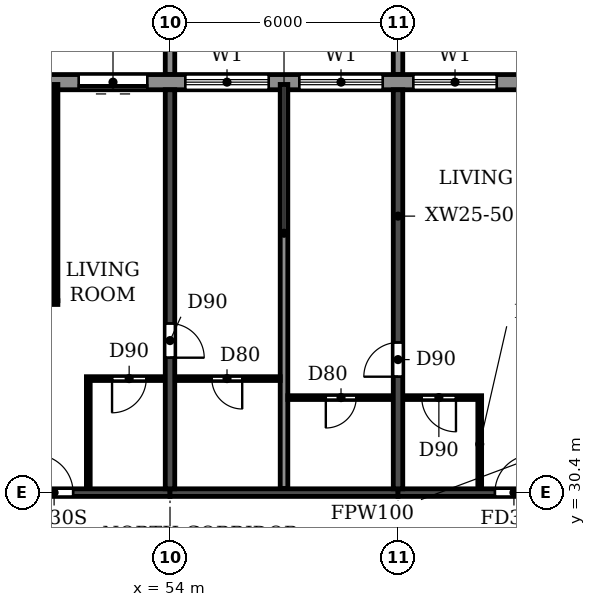
"""IFC4 building model, lengths in metres.
Left out: names, types, materials, properties, quantities, classifications, styles, units other than length and angle.
Written with IfcOpenShell. Run it as: python <this file> out.ifc"""

import sys

from ifc_helpers import new_model, si_unit, direction, frame, frame_2d, origin, place, context, subcontext, project, spatial, polyline, rectangle, outline, extrude, source, transform, mapped, element, fill, save


model = new_model("IFC4")
c1 = context("Model", 3, precision=1e-05, world=origin(), true_north=direction((0.0, 1.0)))
c2 = subcontext(c1, "Body", "Model", "MODEL_VIEW")
j1 = project(units=[si_unit("LENGTHUNIT", "METRE"), si_unit("PLANEANGLEUNIT", "RADIAN")], contexts=[c1])
p1 = place(None, origin())
s1 = spatial("IfcSite", under=j1, at=p1, CompositionType="ELEMENT")
p2 = place(p1, origin())
s2 = spatial("IfcBuilding", under=s1, at=p2, CompositionType="ELEMENT")
p3 = place(p2, frame((0.0, 0.0, 241.2)))
s3 = spatial("IfcBuildingStorey", under=s2, at=p3, CompositionType="ELEMENT", Elevation=241.2)
p4 = place(p3, frame((54.0, 30.5, 0.0), z_axis=(0.0, 0.0, 1.0), x_axis=(0.0, 1.0, 0.0)))
e1 = element("IfcWall", 1, at=p4, inside=s3, PredefinedType="SHEAR", context=c2, shape_type="SweptSolid", body=[
    extrude(rectangle(XDim=10.5, YDim=0.25, at=frame_2d((5.25, 0.0))), origin(), (0.0, 0.0, 1.0), 3.08),
])
p5 = place(p4, frame((3.45, 0.0, 0.0)))
e2 = element("IfcOpeningElement", 2, at=p5, cuts=e1, PredefinedType="OPENING", context=c2, shape_type="SweptSolid", body=[
    extrude(rectangle(XDim=0.9, YDim=2.1, at=frame_2d((0.45, 1.05))), frame((0.0, 0.135, 0.0), z_axis=(0.0, -1.0, 0.0), x_axis=(1.0, 0.0, 0.0)), (0.0, 0.0, 1.0), 0.27),
])
p6 = place(p3, frame((60.0, 30.5, 0.0), z_axis=(0.0, 0.0, 1.0), x_axis=(0.0, 1.0, 0.0)))
e3 = element("IfcWall", 3, at=p6, inside=s3, PredefinedType="SHEAR", context=c2, shape_type="SweptSolid", body=[
    extrude(rectangle(XDim=10.5, YDim=0.25, at=frame_2d((5.25, 0.0))), origin(), (0.0, 0.0, 1.0), 3.08),
])
p7 = place(p6, frame((2.95, 0.0, 0.0)))
e4 = element("IfcOpeningElement", 4, at=p7, cuts=e3, PredefinedType="OPENING", context=c2, shape_type="SweptSolid", body=[
    extrude(rectangle(XDim=0.9, YDim=2.1, at=frame_2d((0.45, 1.05))), frame((0.0, 0.135, 0.0), z_axis=(0.0, -1.0, 0.0), x_axis=(1.0, 0.0, 0.0)), (0.0, 0.0, 1.0), 0.27),
])
p8 = place(p3, frame((48.0, 30.4, 0.0), z_axis=(0.0, 0.0, 1.0), x_axis=(1.0, 0.0, 0.0)))
e5 = element("IfcWall", 5, at=p8, inside=s3, PredefinedType="SHEAR", context=c2, shape_type="SweptSolid", body=[
    extrude(rectangle(XDim=6.0, YDim=0.2, at=frame_2d((3.0, 0.0))), origin(), (0.0, 0.0, 1.0), 2.48),
])
p9 = place(p8, frame((2.45, 0.0, 0.0)))
e6 = element("IfcOpeningElement", 6, at=p9, cuts=e5, PredefinedType="OPENING", context=c2, shape_type="SweptSolid", body=[
    extrude(rectangle(XDim=1.0, YDim=2.1, at=frame_2d((0.5, 1.05))), frame((0.0, 0.11, 0.0), z_axis=(0.0, -1.0, 0.0), x_axis=(1.0, 0.0, 0.0)), (0.0, 0.0, 1.0), 0.22),
])
p10 = place(p3, frame((54.0, 30.4, 0.0), z_axis=(0.0, 0.0, 1.0), x_axis=(1.0, 0.0, 0.0)))
e7 = element("IfcWall", 7, at=p10, inside=s3, PredefinedType="SHEAR", context=c2, shape_type="SweptSolid", body=[
    extrude(rectangle(XDim=6.0, YDim=0.2, at=frame_2d((3.0, 0.0))), origin(), (0.0, 0.0, 1.0), 2.48),
])
p11 = place(p3, frame((60.0, 30.4, 0.0), z_axis=(0.0, 0.0, 1.0), x_axis=(1.0, 0.0, 0.0)))
e8 = element("IfcWall", 8, at=p11, inside=s3, PredefinedType="SHEAR", context=c2, shape_type="SweptSolid", body=[
    extrude(rectangle(XDim=6.0, YDim=0.2, at=frame_2d((3.0, 0.0))), origin(), (0.0, 0.0, 1.0), 2.48),
])
p12 = place(p11, frame((2.55, 0.0, 0.0)))
e9 = element("IfcOpeningElement", 9, at=p12, cuts=e8, PredefinedType="OPENING", context=c2, shape_type="SweptSolid", body=[
    extrude(rectangle(XDim=1.0, YDim=2.1, at=frame_2d((0.5, 1.05))), frame((0.0, 0.11, 0.0), z_axis=(0.0, -1.0, 0.0), x_axis=(1.0, 0.0, 0.0)), (0.0, 0.0, 1.0), 0.22),
])
p13 = place(p3, frame((79.317, 41.2, 0.0), z_axis=(0.0, 0.0, 1.0), x_axis=(-1.0, 0.0, 0.0)))
e10 = element("IfcWall", 10, at=p13, inside=s3, PredefinedType="STANDARD", context=c2, shape_type="SweptSolid", body=[
    extrude(rectangle(XDim=56.634, YDim=0.4, at=frame_2d((28.317, 0.0))), origin(), (0.0, 0.0, 1.0), 3.08),
])
p14 = place(p13, frame((52.917, 0.0, 0.0)))
e11 = element("IfcOpeningElement", 11, at=p14, cuts=e10, PredefinedType="OPENING", context=c2, shape_type="SweptSolid", body=[
    extrude(rectangle(XDim=1.8, YDim=2.4, at=frame_2d((0.9, 1.2))), frame((0.0, 0.21, 0.0), z_axis=(0.0, -1.0, 0.0), x_axis=(1.0, 0.0, 0.0)), (0.0, 0.0, 1.0), 0.42),
])
p15 = place(p13, frame((49.717, 0.0, 0.9)))
e12 = element("IfcOpeningElement", 12, at=p15, cuts=e10, PredefinedType="OPENING", context=c2, shape_type="SweptSolid", body=[
    extrude(rectangle(XDim=2.2, YDim=1.5, at=frame_2d((1.1, 0.75))), frame((0.0, 0.21, 0.0), z_axis=(0.0, -1.0, 0.0), x_axis=(1.0, 0.0, 0.0)), (0.0, 0.0, 1.0), 0.42),
])
p16 = place(p13, frame((46.717, 0.0, 0.9)))
e13 = element("IfcOpeningElement", 13, at=p16, cuts=e10, PredefinedType="OPENING", context=c2, shape_type="SweptSolid", body=[
    extrude(rectangle(XDim=2.2, YDim=1.5, at=frame_2d((1.1, 0.75))), frame((0.0, 0.21, 0.0), z_axis=(0.0, -1.0, 0.0), x_axis=(1.0, 0.0, 0.0)), (0.0, 0.0, 1.0), 0.42),
])
p17 = place(p13, frame((43.717, 0.0, 0.9)))
e14 = element("IfcOpeningElement", 14, at=p17, cuts=e10, PredefinedType="OPENING", context=c2, shape_type="SweptSolid", body=[
    extrude(rectangle(XDim=2.2, YDim=1.5, at=frame_2d((1.1, 0.75))), frame((0.0, 0.21, 0.0), z_axis=(0.0, -1.0, 0.0), x_axis=(1.0, 0.0, 0.0)), (0.0, 0.0, 1.0), 0.42),
])
p18 = place(p13, frame((40.917, 0.0, 0.0)))
e15 = element("IfcOpeningElement", 15, at=p18, cuts=e10, PredefinedType="OPENING", context=c2, shape_type="SweptSolid", body=[
    extrude(rectangle(XDim=1.8, YDim=2.4, at=frame_2d((0.9, 1.2))), frame((0.0, 0.21, 0.0), z_axis=(0.0, -1.0, 0.0), x_axis=(1.0, 0.0, 0.0)), (0.0, 0.0, 1.0), 0.42),
])
p19 = place(p13, frame((37.717, 0.0, 0.9)))
e16 = element("IfcOpeningElement", 16, at=p19, cuts=e10, PredefinedType="OPENING", context=c2, shape_type="SweptSolid", body=[
    extrude(rectangle(XDim=2.2, YDim=1.5, at=frame_2d((1.1, 0.75))), frame((0.0, 0.21, 0.0), z_axis=(0.0, -1.0, 0.0), x_axis=(1.0, 0.0, 0.0)), (0.0, 0.0, 1.0), 0.42),
])
p20 = place(p13, frame((34.717, 0.0, 0.9)))
e17 = element("IfcOpeningElement", 17, at=p20, cuts=e10, PredefinedType="OPENING", context=c2, shape_type="SweptSolid", body=[
    extrude(rectangle(XDim=2.2, YDim=1.5, at=frame_2d((1.1, 0.75))), frame((0.0, 0.21, 0.0), z_axis=(0.0, -1.0, 0.0), x_axis=(1.0, 0.0, 0.0)), (0.0, 0.0, 1.0), 0.42),
])
p21 = place(p13, frame((31.717, 0.0, 0.9)))
e18 = element("IfcOpeningElement", 18, at=p21, cuts=e10, PredefinedType="OPENING", context=c2, shape_type="SweptSolid", body=[
    extrude(rectangle(XDim=2.2, YDim=1.5, at=frame_2d((1.1, 0.75))), frame((0.0, 0.21, 0.0), z_axis=(0.0, -1.0, 0.0), x_axis=(1.0, 0.0, 0.0)), (0.0, 0.0, 1.0), 0.42),
])
p22 = place(p13, frame((28.717, 0.0, 0.9)))
e19 = element("IfcOpeningElement", 19, at=p22, cuts=e10, PredefinedType="OPENING", context=c2, shape_type="SweptSolid", body=[
    extrude(rectangle(XDim=2.2, YDim=1.5, at=frame_2d((1.1, 0.75))), frame((0.0, 0.21, 0.0), z_axis=(0.0, -1.0, 0.0), x_axis=(1.0, 0.0, 0.0)), (0.0, 0.0, 1.0), 0.42),
])
p23 = place(p13, frame((25.917, 0.0, 0.0)))
e20 = element("IfcOpeningElement", 20, at=p23, cuts=e10, PredefinedType="OPENING", context=c2, shape_type="SweptSolid", body=[
    extrude(rectangle(XDim=1.8, YDim=2.4, at=frame_2d((0.9, 1.2))), frame((0.0, 0.21, 0.0), z_axis=(0.0, -1.0, 0.0), x_axis=(1.0, 0.0, 0.0)), (0.0, 0.0, 1.0), 0.42),
])
p24 = place(p13, frame((22.717, 0.0, 0.9)))
e21 = element("IfcOpeningElement", 21, at=p24, cuts=e10, PredefinedType="OPENING", context=c2, shape_type="SweptSolid", body=[
    extrude(rectangle(XDim=2.2, YDim=1.5, at=frame_2d((1.1, 0.75))), frame((0.0, 0.21, 0.0), z_axis=(0.0, -1.0, 0.0), x_axis=(1.0, 0.0, 0.0)), (0.0, 0.0, 1.0), 0.42),
])
p25 = place(p13, frame((19.717, 0.0, 0.9)))
e22 = element("IfcOpeningElement", 22, at=p25, cuts=e10, PredefinedType="OPENING", context=c2, shape_type="SweptSolid", body=[
    extrude(rectangle(XDim=2.2, YDim=1.5, at=frame_2d((1.1, 0.75))), frame((0.0, 0.21, 0.0), z_axis=(0.0, -1.0, 0.0), x_axis=(1.0, 0.0, 0.0)), (0.0, 0.0, 1.0), 0.42),
])
p26 = place(p13, frame((16.717, 0.0, 0.9)))
e23 = element("IfcOpeningElement", 23, at=p26, cuts=e10, PredefinedType="OPENING", context=c2, shape_type="SweptSolid", body=[
    extrude(rectangle(XDim=2.2, YDim=1.5, at=frame_2d((1.1, 0.75))), frame((0.0, 0.21, 0.0), z_axis=(0.0, -1.0, 0.0), x_axis=(1.0, 0.0, 0.0)), (0.0, 0.0, 1.0), 0.42),
])
p27 = place(p13, frame((13.917, 0.0, 0.0)))
e24 = element("IfcOpeningElement", 24, at=p27, cuts=e10, PredefinedType="OPENING", context=c2, shape_type="SweptSolid", body=[
    extrude(rectangle(XDim=1.8, YDim=2.4, at=frame_2d((0.9, 1.2))), frame((0.0, 0.21, 0.0), z_axis=(0.0, -1.0, 0.0), x_axis=(1.0, 0.0, 0.0)), (0.0, 0.0, 1.0), 0.42),
])
p28 = place(p13, frame((10.717, 0.0, 0.9)))
e25 = element("IfcOpeningElement", 25, at=p28, cuts=e10, PredefinedType="OPENING", context=c2, shape_type="SweptSolid", body=[
    extrude(rectangle(XDim=2.2, YDim=1.5, at=frame_2d((1.1, 0.75))), frame((0.0, 0.21, 0.0), z_axis=(0.0, -1.0, 0.0), x_axis=(1.0, 0.0, 0.0)), (0.0, 0.0, 1.0), 0.42),
])
p29 = place(p13, frame((7.917, 0.0, 0.0)))
e26 = element("IfcOpeningElement", 26, at=p29, cuts=e10, PredefinedType="OPENING", context=c2, shape_type="SweptSolid", body=[
    extrude(rectangle(XDim=1.8, YDim=2.4, at=frame_2d((0.9, 1.2))), frame((0.0, 0.21, 0.0), z_axis=(0.0, -1.0, 0.0), x_axis=(1.0, 0.0, 0.0)), (0.0, 0.0, 1.0), 0.42),
])
p30 = place(p13, frame((4.717, 0.0, 0.9)))
e27 = element("IfcOpeningElement", 27, at=p30, cuts=e10, PredefinedType="OPENING", context=c2, shape_type="SweptSolid", body=[
    extrude(rectangle(XDim=2.2, YDim=1.5, at=frame_2d((1.1, 0.75))), frame((0.0, 0.21, 0.0), z_axis=(0.0, -1.0, 0.0), x_axis=(1.0, 0.0, 0.0)), (0.0, 0.0, 1.0), 0.42),
])
p31 = place(p13, frame((1.917, 0.0, 0.0)))
e28 = element("IfcOpeningElement", 28, at=p31, cuts=e10, PredefinedType="OPENING", context=c2, shape_type="SweptSolid", body=[
    extrude(rectangle(XDim=1.8, YDim=2.4, at=frame_2d((0.9, 1.2))), frame((0.0, 0.21, 0.0), z_axis=(0.0, -1.0, 0.0), x_axis=(1.0, 0.0, 0.0)), (0.0, 0.0, 1.0), 0.42),
])
m1 = source(origin(), c2, "Body", "SweptSolid", [
    extrude(outline(polyline([(0.0, 0.0), (0.25, 0.0), (0.25, 3.1), (0.0, 3.1), (0.0, 0.0)])), origin(), (0.0, 0.0, 1.0), 3.1),
])
for number, where in (
    (29, (53.875, 41.4, 0.0)),
    (30, (59.875, 41.4, 0.0)),
):
    element("IfcWall", number, at=place(p3, frame(where)), inside=s3, PredefinedType="STANDARD", context=c2, shape_type="MappedRepresentation", body=[
        mapped(m1, transform((0.0, 0.0, 0.0))),
    ])
p32 = place(p3, frame((57.0, 30.51, 0.0), z_axis=(0.0, 0.0, 1.0), x_axis=(0.0, 1.0, 0.0)))
e31 = element("IfcWall", 31, at=p32, inside=s3, PredefinedType="PARTITIONING", context=c2, shape_type="SweptSolid", body=[
    extrude(rectangle(XDim=10.63, YDim=0.2, at=frame_2d((5.315, 0.0))), origin(), (0.0, 0.0, 1.0), 3.08),
])
p33 = place(p3, frame((57.1, 32.9, 0.0), z_axis=(0.0, 0.0, 1.0), x_axis=(1.0, 0.0, 0.0)))
e32 = element("IfcWall", 32, at=p33, inside=s3, PredefinedType="PARTITIONING", context=c2, shape_type="SweptSolid", body=[
    extrude(rectangle(XDim=2.765, YDim=0.1, at=frame_2d((1.382, 0.0))), origin(), (0.0, 0.0, 1.0), 3.08),
])
p34 = place(p33, frame((1.0, 0.0, 0.0)))
e33 = element("IfcOpeningElement", 33, at=p34, cuts=e32, PredefinedType="OPENING", context=c2, shape_type="SweptSolid", body=[
    extrude(rectangle(XDim=0.8, YDim=2.1, at=frame_2d((0.4, 1.05))), frame((0.0, 0.06, 0.0), z_axis=(0.0, -1.0, 0.0), x_axis=(1.0, 0.0, 0.0)), (0.0, 0.0, 1.0), 0.12),
])
p35 = place(p3, frame((60.135, 32.9, 0.0), z_axis=(0.0, 0.0, 1.0), x_axis=(1.0, 0.0, 0.0)))
e34 = element("IfcWall", 34, at=p35, inside=s3, PredefinedType="PARTITIONING", context=c2, shape_type="SweptSolid", body=[
    extrude(rectangle(XDim=2.065, YDim=0.1, at=frame_2d((1.032, 0.0))), origin(), (0.0, 0.0, 1.0), 3.08),
])
p36 = place(p35, frame((0.49, 0.0, 0.0)))
e35 = element("IfcOpeningElement", 35, at=p36, cuts=e34, PredefinedType="OPENING", context=c2, shape_type="SweptSolid", body=[
    extrude(rectangle(XDim=0.9, YDim=2.1, at=frame_2d((0.45, 1.05))), frame((0.0, 0.06, 0.0), z_axis=(0.0, -1.0, 0.0), x_axis=(1.0, 0.0, 0.0)), (0.0, 0.0, 1.0), 0.12),
])
p37 = place(p3, frame((51.8, 33.4, 0.0), z_axis=(0.0, 0.0, 1.0), x_axis=(1.0, 0.0, 0.0)))
e36 = element("IfcWall", 36, at=p37, inside=s3, PredefinedType="PARTITIONING", context=c2, shape_type="SweptSolid", body=[
    extrude(rectangle(XDim=2.065, YDim=0.1, at=frame_2d((1.032, 0.0))), origin(), (0.0, 0.0, 1.0), 3.08),
])
p38 = place(p37, frame((0.675, 0.0, 0.0)))
e37 = element("IfcOpeningElement", 37, at=p38, cuts=e36, PredefinedType="OPENING", context=c2, shape_type="SweptSolid", body=[
    extrude(rectangle(XDim=0.9, YDim=2.1, at=frame_2d((0.45, 1.05))), frame((0.0, 0.06, 0.0), z_axis=(0.0, -1.0, 0.0), x_axis=(1.0, 0.0, 0.0)), (0.0, 0.0, 1.0), 0.12),
])
p39 = place(p3, frame((54.135, 33.4, 0.0), z_axis=(0.0, 0.0, 1.0), x_axis=(1.0, 0.0, 0.0)))
e38 = element("IfcWall", 38, at=p39, inside=s3, PredefinedType="PARTITIONING", context=c2, shape_type="SweptSolid", body=[
    extrude(rectangle(XDim=2.765, YDim=0.1, at=frame_2d((1.382, 0.0))), origin(), (0.0, 0.0, 1.0), 3.08),
])
p40 = place(p39, frame((0.965, 0.0, 0.0)))
e39 = element("IfcOpeningElement", 39, at=p40, cuts=e38, PredefinedType="OPENING", context=c2, shape_type="SweptSolid", body=[
    extrude(rectangle(XDim=0.8, YDim=2.1, at=frame_2d((0.4, 1.05))), frame((0.0, 0.06, 0.0), z_axis=(0.0, -1.0, 0.0), x_axis=(1.0, 0.0, 0.0)), (0.0, 0.0, 1.0), 0.12),
])
p41 = place(p3, frame((48.135, 35.4, 0.0), z_axis=(0.0, 0.0, 1.0), x_axis=(1.0, 0.0, 0.0)))
e40 = element("IfcWall", 40, at=p41, inside=s3, PredefinedType="PARTITIONING", context=c2, shape_type="SweptSolid", body=[
    extrude(rectangle(XDim=2.915, YDim=0.1, at=frame_2d((1.458, 0.0))), origin(), (0.0, 0.0, 1.0), 3.08),
])
p42 = place(p41, frame((1.465, 0.0, 0.0)))
e41 = element("IfcOpeningElement", 41, at=p42, cuts=e40, PredefinedType="OPENING", context=c2, shape_type="SweptSolid", body=[
    extrude(rectangle(XDim=0.9, YDim=2.1, at=frame_2d((0.45, 1.05))), frame((0.0, 0.06, 0.0), z_axis=(0.0, -1.0, 0.0), x_axis=(1.0, 0.0, 0.0)), (0.0, 0.0, 1.0), 0.12),
])
p43 = place(p3, frame((51.0, 35.45, 0.0), z_axis=(0.0, 0.0, 1.0), x_axis=(0.0, 1.0, 0.0)))
e42 = element("IfcWall", 42, at=p43, inside=s3, PredefinedType="PARTITIONING", context=c2, shape_type="SweptSolid", body=[
    extrude(rectangle(XDim=5.69, YDim=0.1, at=frame_2d((2.845, 0.0))), origin(), (0.0, 0.0, 1.0), 3.08),
])
p44 = place(p3, frame((51.85, 30.51, 0.0), z_axis=(0.0, 0.0, 1.0), x_axis=(0.0, 1.0, 0.0)))
e43 = element("IfcWall", 43, at=p44, inside=s3, PredefinedType="PARTITIONING", context=c2, shape_type="SweptSolid", body=[
    extrude(rectangle(XDim=2.84, YDim=0.1, at=frame_2d((1.42, 0.0))), origin(), (0.0, 0.0, 1.0), 3.08),
])
p45 = place(p3, frame((62.15, 30.51, 0.0), z_axis=(0.0, 0.0, 1.0), x_axis=(0.0, 1.0, 0.0)))
e44 = element("IfcWall", 44, at=p45, inside=s3, PredefinedType="PARTITIONING", context=c2, shape_type="SweptSolid", body=[
    extrude(rectangle(XDim=2.34, YDim=0.1, at=frame_2d((1.17, 0.0))), origin(), (0.0, 0.0, 1.0), 3.08),
])
p46 = place(p23, origin())
e45 = element("IfcDoor", 45, at=p46, inside=s3, OperationType="DOUBLE_DOOR_SLIDING", PredefinedType="DOOR", context=c2, shape_type="SweptSolid", body=[
    extrude(rectangle(XDim=1.8, YDim=2.4, at=frame_2d((0.9, 1.2))), frame((0.0, 0.025, 0.0), z_axis=(0.0, -1.0, 0.0), x_axis=(1.0, 0.0, 0.0)), (0.0, 0.0, 1.0), 0.05),
])
fill(e20, e45)
p47 = place(p24, origin())
e46 = element("IfcWindow", 46, at=p47, inside=s3, PartitioningType="DOUBLE_PANEL_HORIZONTAL", PredefinedType="WINDOW", context=c2, shape_type="SweptSolid", body=[
    extrude(rectangle(XDim=2.2, YDim=1.5, at=frame_2d((1.1, 0.75))), frame((0.0, 0.03, 0.0), z_axis=(0.0, -1.0, 0.0), x_axis=(1.0, 0.0, 0.0)), (0.0, 0.0, 1.0), 0.06),
])
fill(e21, e46)
p48 = place(p25, origin())
e47 = element("IfcWindow", 47, at=p48, inside=s3, PartitioningType="DOUBLE_PANEL_HORIZONTAL", PredefinedType="WINDOW", context=c2, shape_type="SweptSolid", body=[
    extrude(rectangle(XDim=2.2, YDim=1.5, at=frame_2d((1.1, 0.75))), frame((0.0, 0.03, 0.0), z_axis=(0.0, -1.0, 0.0), x_axis=(1.0, 0.0, 0.0)), (0.0, 0.0, 1.0), 0.06),
])
fill(e22, e47)
p49 = place(p26, origin())
e48 = element("IfcWindow", 48, at=p49, inside=s3, PartitioningType="DOUBLE_PANEL_HORIZONTAL", PredefinedType="WINDOW", context=c2, shape_type="SweptSolid", body=[
    extrude(rectangle(XDim=2.2, YDim=1.5, at=frame_2d((1.1, 0.75))), frame((0.0, 0.03, 0.0), z_axis=(0.0, -1.0, 0.0), x_axis=(1.0, 0.0, 0.0)), (0.0, 0.0, 1.0), 0.06),
])
fill(e23, e48)
p50 = place(p40, frame((0.8, 0.0, 0.0), z_axis=(0.0, 0.0, 1.0), x_axis=(-1.0, 0.0, 0.0)))
e49 = element("IfcDoor", 49, at=p50, inside=s3, OperationType="SINGLE_SWING_LEFT", PredefinedType="DOOR", context=c2, shape_type="SweptSolid", body=[
    extrude(rectangle(XDim=0.8, YDim=2.1, at=frame_2d((0.4, 1.05))), frame((0.0, 0.025, 0.0), z_axis=(0.0, -1.0, 0.0), x_axis=(1.0, 0.0, 0.0)), (0.0, 0.0, 1.0), 0.05),
])
fill(e39, e49)
p51 = place(p9, origin())
e50 = element("IfcDoor", 50, at=p51, inside=s3, OperationType="SINGLE_SWING_LEFT", PredefinedType="DOOR", context=c2, shape_type="SweptSolid", body=[
    extrude(rectangle(XDim=1.0, YDim=2.1, at=frame_2d((0.5, 1.05))), frame((0.0, 0.025, 0.0), z_axis=(0.0, -1.0, 0.0), x_axis=(1.0, 0.0, 0.0)), (0.0, 0.0, 1.0), 0.05),
])
fill(e6, e50)
p52 = place(p38, frame((0.9, 0.0, 0.0), z_axis=(0.0, 0.0, 1.0), x_axis=(-1.0, 0.0, 0.0)))
e51 = element("IfcDoor", 51, at=p52, inside=s3, OperationType="SINGLE_SWING_RIGHT", PredefinedType="DOOR", context=c2, shape_type="SweptSolid", body=[
    extrude(rectangle(XDim=0.9, YDim=2.1, at=frame_2d((0.45, 1.05))), frame((0.0, 0.025, 0.0), z_axis=(0.0, -1.0, 0.0), x_axis=(1.0, 0.0, 0.0)), (0.0, 0.0, 1.0), 0.05),
])
fill(e37, e51)
p53 = place(p5, frame((0.9, 0.0, 0.0), z_axis=(0.0, 0.0, 1.0), x_axis=(-1.0, 0.0, 0.0)))
e52 = element("IfcDoor", 52, at=p53, inside=s3, OperationType="SINGLE_SWING_RIGHT", PredefinedType="DOOR", context=c2, shape_type="SweptSolid", body=[
    extrude(rectangle(XDim=0.9, YDim=2.1, at=frame_2d((0.45, 1.05))), frame((0.0, 0.025, 0.0), z_axis=(0.0, -1.0, 0.0), x_axis=(1.0, 0.0, 0.0)), (0.0, 0.0, 1.0), 0.05),
])
fill(e2, e52)
p54 = place(p34, frame((0.8, 0.0, 0.0), z_axis=(0.0, 0.0, 1.0), x_axis=(-1.0, 0.0, 0.0)))
e53 = element("IfcDoor", 53, at=p54, inside=s3, OperationType="SINGLE_SWING_RIGHT", PredefinedType="DOOR", context=c2, shape_type="SweptSolid", body=[
    extrude(rectangle(XDim=0.8, YDim=2.1, at=frame_2d((0.4, 1.05))), frame((0.0, 0.025, 0.0), z_axis=(0.0, -1.0, 0.0), x_axis=(1.0, 0.0, 0.0)), (0.0, 0.0, 1.0), 0.05),
])
fill(e33, e53)
p55 = place(p7, origin())
e54 = element("IfcDoor", 54, at=p55, inside=s3, OperationType="SINGLE_SWING_LEFT", PredefinedType="DOOR", context=c2, shape_type="SweptSolid", body=[
    extrude(rectangle(XDim=0.9, YDim=2.1, at=frame_2d((0.45, 1.05))), frame((0.0, 0.025, 0.0), z_axis=(0.0, -1.0, 0.0), x_axis=(1.0, 0.0, 0.0)), (0.0, 0.0, 1.0), 0.05),
])
fill(e4, e54)
p56 = place(p36, frame((0.9, 0.0, 0.0), z_axis=(0.0, 0.0, 1.0), x_axis=(-1.0, 0.0, 0.0)))
e55 = element("IfcDoor", 55, at=p56, inside=s3, OperationType="SINGLE_SWING_LEFT", PredefinedType="DOOR", context=c2, shape_type="SweptSolid", body=[
    extrude(rectangle(XDim=0.9, YDim=2.1, at=frame_2d((0.45, 1.05))), frame((0.0, 0.025, 0.0), z_axis=(0.0, -1.0, 0.0), x_axis=(1.0, 0.0, 0.0)), (0.0, 0.0, 1.0), 0.05),
])
fill(e35, e55)
p57 = place(p12, origin())
e56 = element("IfcDoor", 56, at=p57, inside=s3, OperationType="SINGLE_SWING_RIGHT", PredefinedType="DOOR", context=c2, shape_type="SweptSolid", body=[
    extrude(rectangle(XDim=1.0, YDim=2.1, at=frame_2d((0.5, 1.05))), frame((0.0, 0.025, 0.0), z_axis=(0.0, -1.0, 0.0), x_axis=(1.0, 0.0, 0.0)), (0.0, 0.0, 1.0), 0.05),
])
fill(e9, e56)
save(model, sys.argv[1])
